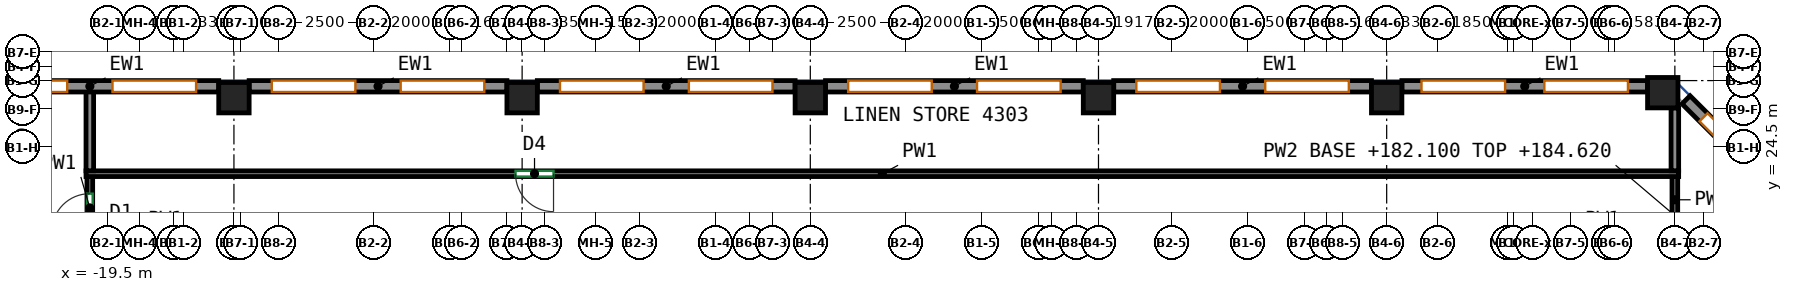
"""IFC4 building model, lengths in metres.
Left out: names, types, materials, properties, quantities, classifications, styles, units other than length and angle.
Written with IfcOpenShell. Run it as: python <this file> out.ifc"""

import sys

from ifc_helpers import new_model, si_unit, direction, frame, frame_2d, origin, origin_2d, place, context, subcontext, project, spatial, rectangle, extrude, source, transform, mapped, element, fill, save


model = new_model("IFC4")
c1 = context("Model", 3, precision=1e-05, world=origin(), true_north=direction((0.0, 1.0)))
c2 = subcontext(c1, "Body", "Model", "MODEL_VIEW")
j1 = project(units=[si_unit("LENGTHUNIT", "METRE"), si_unit("PLANEANGLEUNIT", "RADIAN")], contexts=[c1])
p1 = place(None, origin())
s1 = spatial("IfcSite", under=j1, at=p1, CompositionType="ELEMENT")
p2 = place(p1, origin())
s2 = spatial("IfcBuilding", under=s1, at=p2, CompositionType="ELEMENT")
p3 = place(p2, frame((0.0, 0.0, 182.1)))
s3 = spatial("IfcBuildingStorey", under=s2, at=p3, CompositionType="ELEMENT", Elevation=182.1)
m1 = source(origin(), c2, "Body", "SweptSolid", [
    extrude(rectangle(XDim=0.8, YDim=0.8, at=origin_2d()), origin(), (0.0, 0.0, 1.0), 3.12),
])
for number, where, z_axis, x_axis in (
    (1, (-16.167, 25.8, 0.0), (0.0, 0.0, 1.0), (1.0, 0.0, 0.0)),
    (2, (-8.583, 25.8, 0.0), (0.0, 0.0, 1.0), (1.0, 0.0, 0.0)),
    (3, (-1.0, 25.8, 0.0), (0.0, 0.0, 1.0), (1.0, 0.0, 0.0)),
    (4, (6.583, 25.8, 0.0), (0.0, 0.0, 1.0), (1.0, 0.0, 0.0)),
    (5, (14.167, 25.8, 0.0), (0.0, 0.0, 1.0), (1.0, 0.0, 0.0)),
    (6, (21.432, 25.932, 0.0), (0.0, 0.0, 1.0), (1.0, 0.0, 0.0)),
):
    element("IfcColumn", number, at=place(p3, frame(where, z_axis=z_axis, x_axis=x_axis)), inside=s3, PredefinedType="COLUMN", context=c2, shape_type="MappedRepresentation", body=[
        mapped(m1, transform((0.0, 0.0, 0.0))),
    ])
m2 = source(origin(), c2, "Body", "SweptSolid", [
    extrude(rectangle(XDim=3.5, YDim=0.3, at=frame_2d((1.75, 0.0))), origin(), (0.0, 0.0, 1.0), 3.12),
])
p4 = place(p3, frame((24.519, 23.269, 0.0), z_axis=(0.0, 0.0, 1.0), x_axis=(-0.70707190453, 0.707141656123, 0.0)))
e7 = element("IfcWall", 7, at=p4, inside=s3, PredefinedType="SOLIDWALL", context=c2, shape_type="MappedRepresentation", body=[
    mapped(m2, transform((0.0, 0.0, 0.0))),
])
p5 = place(p4, frame((0.65, 0.0, 0.85)))
e8 = element("IfcOpeningElement", 8, at=p5, cuts=e7, PredefinedType="OPENING", context=c2, shape_type="SweptSolid", body=[
    extrude(rectangle(XDim=2.2, YDim=1.95, at=frame_2d((1.1, 0.975))), frame((0.0, 0.16, 0.0), z_axis=(0.0, -1.0, 0.0), x_axis=(1.0, 0.0, 0.0)), (0.0, 0.0, 1.0), 0.32),
])
m3 = source(origin(), c2, "Body", "SweptSolid", [
    extrude(rectangle(XDim=6.465, YDim=0.3, at=frame_2d((3.232, 0.0))), origin(), (0.0, 0.0, 1.0), 3.12),
])
p6 = place(p3, frame((21.032, 26.1, 0.0), z_axis=(0.0, 0.0, 1.0), x_axis=(-1.0, 0.0, 0.0)))
e9 = element("IfcWall", 9, at=p6, inside=s3, PredefinedType="SOLIDWALL", context=c2, shape_type="MappedRepresentation", body=[
    mapped(m3, transform((0.0, 0.0, 0.0))),
])
p7 = place(p6, frame((0.516, 0.0, 0.85)))
e10 = element("IfcOpeningElement", 10, at=p7, cuts=e9, PredefinedType="OPENING", context=c2, shape_type="SweptSolid", body=[
    extrude(rectangle(XDim=2.2, YDim=1.95, at=frame_2d((1.1, 0.975))), frame((0.0, 0.16, 0.0), z_axis=(0.0, -1.0, 0.0), x_axis=(1.0, 0.0, 0.0)), (0.0, 0.0, 1.0), 0.32),
])
p8 = place(p6, frame((3.749, 0.0, 0.85)))
e11 = element("IfcOpeningElement", 11, at=p8, cuts=e9, PredefinedType="OPENING", context=c2, shape_type="SweptSolid", body=[
    extrude(rectangle(XDim=2.2, YDim=1.95, at=frame_2d((1.1, 0.975))), frame((0.0, 0.16, 0.0), z_axis=(0.0, -1.0, 0.0), x_axis=(1.0, 0.0, 0.0)), (0.0, 0.0, 1.0), 0.32),
])
m4 = source(origin(), c2, "Body", "SweptSolid", [
    extrude(rectangle(XDim=6.783, YDim=0.3, at=frame_2d((3.392, 0.0))), origin(), (0.0, 0.0, 1.0), 3.12),
])
p9 = place(p3, frame((13.767, 26.1, 0.0), z_axis=(0.0, 0.0, 1.0), x_axis=(-1.0, 0.0, 0.0)))
e12 = element("IfcWall", 12, at=p9, inside=s3, PredefinedType="SOLIDWALL", context=c2, shape_type="MappedRepresentation", body=[
    mapped(m4, transform((0.0, 0.0, 0.0))),
])
p10 = place(p9, frame((0.596, 0.0, 0.85)))
e13 = element("IfcOpeningElement", 13, at=p10, cuts=e12, PredefinedType="OPENING", context=c2, shape_type="SweptSolid", body=[
    extrude(rectangle(XDim=2.2, YDim=1.95, at=frame_2d((1.1, 0.975))), frame((0.0, 0.16, 0.0), z_axis=(0.0, -1.0, 0.0), x_axis=(1.0, 0.0, 0.0)), (0.0, 0.0, 1.0), 0.32),
])
p11 = place(p9, frame((3.988, 0.0, 0.85)))
e14 = element("IfcOpeningElement", 14, at=p11, cuts=e12, PredefinedType="OPENING", context=c2, shape_type="SweptSolid", body=[
    extrude(rectangle(XDim=2.2, YDim=1.95, at=frame_2d((1.1, 0.975))), frame((0.0, 0.16, 0.0), z_axis=(0.0, -1.0, 0.0), x_axis=(1.0, 0.0, 0.0)), (0.0, 0.0, 1.0), 0.32),
])
m5 = source(origin(), c2, "Body", "SweptSolid", [
    extrude(rectangle(XDim=6.783, YDim=0.3, at=frame_2d((3.392, 0.0))), origin(), (0.0, 0.0, 1.0), 3.12),
])
p12 = place(p3, frame((6.183, 26.1, 0.0), z_axis=(0.0, 0.0, 1.0), x_axis=(-1.0, 0.0, 0.0)))
e15 = element("IfcWall", 15, at=p12, inside=s3, PredefinedType="SOLIDWALL", context=c2, shape_type="MappedRepresentation", body=[
    mapped(m5, transform((0.0, 0.0, 0.0))),
])
p13 = place(p12, frame((0.596, 0.0, 0.85)))
e16 = element("IfcOpeningElement", 16, at=p13, cuts=e15, PredefinedType="OPENING", context=c2, shape_type="SweptSolid", body=[
    extrude(rectangle(XDim=2.2, YDim=1.95, at=frame_2d((1.1, 0.975))), frame((0.0, 0.16, 0.0), z_axis=(0.0, -1.0, 0.0), x_axis=(1.0, 0.0, 0.0)), (0.0, 0.0, 1.0), 0.32),
])
p14 = place(p12, frame((3.988, 0.0, 0.85)))
e17 = element("IfcOpeningElement", 17, at=p14, cuts=e15, PredefinedType="OPENING", context=c2, shape_type="SweptSolid", body=[
    extrude(rectangle(XDim=2.2, YDim=1.95, at=frame_2d((1.1, 0.975))), frame((0.0, 0.16, 0.0), z_axis=(0.0, -1.0, 0.0), x_axis=(1.0, 0.0, 0.0)), (0.0, 0.0, 1.0), 0.32),
])
p15 = place(p3, frame((-1.4, 26.1, 0.0), z_axis=(0.0, 0.0, 1.0), x_axis=(-1.0, 0.0, 0.0)))
e18 = element("IfcWall", 18, at=p15, inside=s3, PredefinedType="SOLIDWALL", context=c2, shape_type="MappedRepresentation", body=[
    mapped(m5, transform((0.0, 0.0, 0.0))),
])
p16 = place(p15, frame((0.596, 0.0, 0.85)))
e19 = element("IfcOpeningElement", 19, at=p16, cuts=e18, PredefinedType="OPENING", context=c2, shape_type="SweptSolid", body=[
    extrude(rectangle(XDim=2.2, YDim=1.95, at=frame_2d((1.1, 0.975))), frame((0.0, 0.16, 0.0), z_axis=(0.0, -1.0, 0.0), x_axis=(1.0, 0.0, 0.0)), (0.0, 0.0, 1.0), 0.32),
])
p17 = place(p15, frame((3.988, 0.0, 0.85)))
e20 = element("IfcOpeningElement", 20, at=p17, cuts=e18, PredefinedType="OPENING", context=c2, shape_type="SweptSolid", body=[
    extrude(rectangle(XDim=2.2, YDim=1.95, at=frame_2d((1.1, 0.975))), frame((0.0, 0.16, 0.0), z_axis=(0.0, -1.0, 0.0), x_axis=(1.0, 0.0, 0.0)), (0.0, 0.0, 1.0), 0.32),
])
p18 = place(p3, frame((-8.983, 26.1, 0.0), z_axis=(0.0, 0.0, 1.0), x_axis=(-1.0, 0.0, 0.0)))
e21 = element("IfcWall", 21, at=p18, inside=s3, PredefinedType="SOLIDWALL", context=c2, shape_type="MappedRepresentation", body=[
    mapped(m4, transform((0.0, 0.0, 0.0))),
])
p19 = place(p18, frame((0.596, 0.0, 0.85)))
e22 = element("IfcOpeningElement", 22, at=p19, cuts=e21, PredefinedType="OPENING", context=c2, shape_type="SweptSolid", body=[
    extrude(rectangle(XDim=2.2, YDim=1.95, at=frame_2d((1.1, 0.975))), frame((0.0, 0.16, 0.0), z_axis=(0.0, -1.0, 0.0), x_axis=(1.0, 0.0, 0.0)), (0.0, 0.0, 1.0), 0.32),
])
p20 = place(p18, frame((3.988, 0.0, 0.85)))
e23 = element("IfcOpeningElement", 23, at=p20, cuts=e21, PredefinedType="OPENING", context=c2, shape_type="SweptSolid", body=[
    extrude(rectangle(XDim=2.2, YDim=1.95, at=frame_2d((1.1, 0.975))), frame((0.0, 0.16, 0.0), z_axis=(0.0, -1.0, 0.0), x_axis=(1.0, 0.0, 0.0)), (0.0, 0.0, 1.0), 0.32),
])
p21 = place(p3, frame((-16.567, 26.1, 0.0), z_axis=(0.0, 0.0, 1.0), x_axis=(-1.0, 0.0, 0.0)))
e24 = element("IfcWall", 24, at=p21, inside=s3, PredefinedType="SOLIDWALL", context=c2, shape_type="MappedRepresentation", body=[
    mapped(m5, transform((0.0, 0.0, 0.0))),
])
p22 = place(p21, frame((0.596, 0.0, 0.85)))
e25 = element("IfcOpeningElement", 25, at=p22, cuts=e24, PredefinedType="OPENING", context=c2, shape_type="SweptSolid", body=[
    extrude(rectangle(XDim=2.2, YDim=1.95, at=frame_2d((1.1, 0.975))), frame((0.0, 0.16, 0.0), z_axis=(0.0, -1.0, 0.0), x_axis=(1.0, 0.0, 0.0)), (0.0, 0.0, 1.0), 0.32),
])
p23 = place(p21, frame((3.988, 0.0, 0.85)))
e26 = element("IfcOpeningElement", 26, at=p23, cuts=e24, PredefinedType="OPENING", context=c2, shape_type="SweptSolid", body=[
    extrude(rectangle(XDim=2.2, YDim=1.95, at=frame_2d((1.1, 0.975))), frame((0.0, 0.16, 0.0), z_axis=(0.0, -1.0, 0.0), x_axis=(1.0, 0.0, 0.0)), (0.0, 0.0, 1.0), 0.32),
])
p24 = place(p3, frame((-19.959, 22.075, 0.0), z_axis=(0.0, 0.0, 1.0), x_axis=(0.0, 1.0, 0.0)))
e27 = element("IfcWall", 27, at=p24, inside=s3, PredefinedType="PARTITIONING", context=c2, shape_type="SweptSolid", body=[
    extrude(rectangle(XDim=1.65, YDim=0.15, at=frame_2d((0.825, 0.0))), origin(), (0.0, 0.0, 1.0), 3.12),
])
p25 = place(p24, frame((0.2, 0.0, 0.0)))
e28 = element("IfcOpeningElement", 28, at=p25, cuts=e27, PredefinedType="OPENING", context=c2, shape_type="SweptSolid", body=[
    extrude(rectangle(XDim=1.0, YDim=2.1, at=frame_2d((0.5, 1.05))), frame((0.0, 0.085, 0.0), z_axis=(0.0, -1.0, 0.0), x_axis=(1.0, 0.0, 0.0)), (0.0, 0.0, 1.0), 0.17),
])
p26 = place(p3, frame((21.75, 22.503, 0.0), z_axis=(0.0, 0.0, 1.0), x_axis=(0.0, 1.0, 0.0)))
e29 = element("IfcWall", 29, at=p26, inside=s3, PredefinedType="PARTITIONING", context=c2, shape_type="SweptSolid", body=[
    extrude(rectangle(XDim=1.222, YDim=0.15, at=frame_2d((0.611, 0.0))), origin(), (0.0, 0.0, 1.0), 3.12),
])
p27 = place(p3, frame((21.85, 23.8, 0.0), z_axis=(0.0, 0.0, 1.0), x_axis=(-1.0, 0.0, 0.0)))
e30 = element("IfcWall", 30, at=p27, inside=s3, PredefinedType="PARTITIONING", context=c2, shape_type="SweptSolid", body=[
    extrude(rectangle(XDim=41.909, YDim=0.15, at=frame_2d((20.955, 0.0))), origin(), (0.0, 0.0, 1.0), 3.12),
])
p28 = place(p27, frame((29.607, 0.0, 0.0)))
e31 = element("IfcOpeningElement", 31, at=p28, cuts=e30, PredefinedType="OPENING", context=c2, shape_type="SweptSolid", body=[
    extrude(rectangle(XDim=1.0, YDim=2.1, at=frame_2d((0.5, 1.05))), frame((0.0, 0.085, 0.0), z_axis=(0.0, -1.0, 0.0), x_axis=(1.0, 0.0, 0.0)), (0.0, 0.0, 1.0), 0.17),
])
p29 = place(p3, frame((-19.959, 23.877, 0.0), z_axis=(0.0, 0.0, 1.0), x_axis=(0.0, 1.0, 0.0)))
e32 = element("IfcWall", 32, at=p29, inside=s3, PredefinedType="PARTITIONING", context=c2, shape_type="SweptSolid", body=[
    extrude(rectangle(XDim=2.123, YDim=0.2, at=frame_2d((1.062, 0.0))), origin(), (0.0, 0.0, 1.0), 3.12),
])
p30 = place(p3, frame((21.75, 25.532, 0.0), z_axis=(0.0, 0.0, 1.0), x_axis=(0.0, -1.0, 0.0)))
e33 = element("IfcWall", 33, at=p30, inside=s3, PredefinedType="PARTITIONING", context=c2, shape_type="SweptSolid", body=[
    extrude(rectangle(XDim=1.655, YDim=0.2, at=frame_2d((0.828, 0.0))), origin(), (0.0, 0.0, 1.0), 3.12),
])
p31 = place(p5, origin())
e34 = element("IfcWindow", 34, at=p31, inside=s3, PartitioningType="SINGLE_PANEL", PredefinedType="WINDOW", context=c2, shape_type="SweptSolid", body=[
    extrude(rectangle(XDim=2.2, YDim=1.95, at=frame_2d((1.1, 0.975))), frame((0.0, 0.03, 0.0), z_axis=(0.0, -1.0, 0.0), x_axis=(1.0, 0.0, 0.0)), (0.0, 0.0, 1.0), 0.06),
])
fill(e8, e34)
p32 = place(p7, origin())
e35 = element("IfcWindow", 35, at=p32, inside=s3, PartitioningType="SINGLE_PANEL", PredefinedType="WINDOW", context=c2, shape_type="SweptSolid", body=[
    extrude(rectangle(XDim=2.2, YDim=1.95, at=frame_2d((1.1, 0.975))), frame((0.0, 0.03, 0.0), z_axis=(0.0, -1.0, 0.0), x_axis=(1.0, 0.0, 0.0)), (0.0, 0.0, 1.0), 0.06),
])
fill(e10, e35)
p33 = place(p8, origin())
e36 = element("IfcWindow", 36, at=p33, inside=s3, PartitioningType="SINGLE_PANEL", PredefinedType="WINDOW", context=c2, shape_type="SweptSolid", body=[
    extrude(rectangle(XDim=2.2, YDim=1.95, at=frame_2d((1.1, 0.975))), frame((0.0, 0.03, 0.0), z_axis=(0.0, -1.0, 0.0), x_axis=(1.0, 0.0, 0.0)), (0.0, 0.0, 1.0), 0.06),
])
fill(e11, e36)
p34 = place(p10, origin())
e37 = element("IfcWindow", 37, at=p34, inside=s3, PartitioningType="SINGLE_PANEL", PredefinedType="WINDOW", context=c2, shape_type="SweptSolid", body=[
    extrude(rectangle(XDim=2.2, YDim=1.95, at=frame_2d((1.1, 0.975))), frame((0.0, 0.03, 0.0), z_axis=(0.0, -1.0, 0.0), x_axis=(1.0, 0.0, 0.0)), (0.0, 0.0, 1.0), 0.06),
])
fill(e13, e37)
p35 = place(p11, origin())
e38 = element("IfcWindow", 38, at=p35, inside=s3, PartitioningType="SINGLE_PANEL", PredefinedType="WINDOW", context=c2, shape_type="SweptSolid", body=[
    extrude(rectangle(XDim=2.2, YDim=1.95, at=frame_2d((1.1, 0.975))), frame((0.0, 0.03, 0.0), z_axis=(0.0, -1.0, 0.0), x_axis=(1.0, 0.0, 0.0)), (0.0, 0.0, 1.0), 0.06),
])
fill(e14, e38)
p36 = place(p13, origin())
e39 = element("IfcWindow", 39, at=p36, inside=s3, PartitioningType="SINGLE_PANEL", PredefinedType="WINDOW", context=c2, shape_type="SweptSolid", body=[
    extrude(rectangle(XDim=2.2, YDim=1.95, at=frame_2d((1.1, 0.975))), frame((0.0, 0.03, 0.0), z_axis=(0.0, -1.0, 0.0), x_axis=(1.0, 0.0, 0.0)), (0.0, 0.0, 1.0), 0.06),
])
fill(e16, e39)
p37 = place(p14, origin())
e40 = element("IfcWindow", 40, at=p37, inside=s3, PartitioningType="SINGLE_PANEL", PredefinedType="WINDOW", context=c2, shape_type="SweptSolid", body=[
    extrude(rectangle(XDim=2.2, YDim=1.95, at=frame_2d((1.1, 0.975))), frame((0.0, 0.03, 0.0), z_axis=(0.0, -1.0, 0.0), x_axis=(1.0, 0.0, 0.0)), (0.0, 0.0, 1.0), 0.06),
])
fill(e17, e40)
p38 = place(p16, origin())
e41 = element("IfcWindow", 41, at=p38, inside=s3, PartitioningType="SINGLE_PANEL", PredefinedType="WINDOW", context=c2, shape_type="SweptSolid", body=[
    extrude(rectangle(XDim=2.2, YDim=1.95, at=frame_2d((1.1, 0.975))), frame((0.0, 0.03, 0.0), z_axis=(0.0, -1.0, 0.0), x_axis=(1.0, 0.0, 0.0)), (0.0, 0.0, 1.0), 0.06),
])
fill(e19, e41)
p39 = place(p17, origin())
e42 = element("IfcWindow", 42, at=p39, inside=s3, PartitioningType="SINGLE_PANEL", PredefinedType="WINDOW", context=c2, shape_type="SweptSolid", body=[
    extrude(rectangle(XDim=2.2, YDim=1.95, at=frame_2d((1.1, 0.975))), frame((0.0, 0.03, 0.0), z_axis=(0.0, -1.0, 0.0), x_axis=(1.0, 0.0, 0.0)), (0.0, 0.0, 1.0), 0.06),
])
fill(e20, e42)
p40 = place(p19, origin())
e43 = element("IfcWindow", 43, at=p40, inside=s3, PartitioningType="SINGLE_PANEL", PredefinedType="WINDOW", context=c2, shape_type="SweptSolid", body=[
    extrude(rectangle(XDim=2.2, YDim=1.95, at=frame_2d((1.1, 0.975))), frame((0.0, 0.03, 0.0), z_axis=(0.0, -1.0, 0.0), x_axis=(1.0, 0.0, 0.0)), (0.0, 0.0, 1.0), 0.06),
])
fill(e22, e43)
p41 = place(p20, origin())
e44 = element("IfcWindow", 44, at=p41, inside=s3, PartitioningType="SINGLE_PANEL", PredefinedType="WINDOW", context=c2, shape_type="SweptSolid", body=[
    extrude(rectangle(XDim=2.2, YDim=1.95, at=frame_2d((1.1, 0.975))), frame((0.0, 0.03, 0.0), z_axis=(0.0, -1.0, 0.0), x_axis=(1.0, 0.0, 0.0)), (0.0, 0.0, 1.0), 0.06),
])
fill(e23, e44)
p42 = place(p22, origin())
e45 = element("IfcWindow", 45, at=p42, inside=s3, PartitioningType="SINGLE_PANEL", PredefinedType="WINDOW", context=c2, shape_type="SweptSolid", body=[
    extrude(rectangle(XDim=2.2, YDim=1.95, at=frame_2d((1.1, 0.975))), frame((0.0, 0.03, 0.0), z_axis=(0.0, -1.0, 0.0), x_axis=(1.0, 0.0, 0.0)), (0.0, 0.0, 1.0), 0.06),
])
fill(e25, e45)
p43 = place(p23, origin())
e46 = element("IfcWindow", 46, at=p43, inside=s3, PartitioningType="SINGLE_PANEL", PredefinedType="WINDOW", context=c2, shape_type="SweptSolid", body=[
    extrude(rectangle(XDim=2.2, YDim=1.95, at=frame_2d((1.1, 0.975))), frame((0.0, 0.03, 0.0), z_axis=(0.0, -1.0, 0.0), x_axis=(1.0, 0.0, 0.0)), (0.0, 0.0, 1.0), 0.06),
])
fill(e26, e46)
p44 = place(p25, origin())
e47 = element("IfcDoor", 47, at=p44, inside=s3, OperationType="SINGLE_SWING_LEFT", PredefinedType="DOOR", context=c2, shape_type="SweptSolid", body=[
    extrude(rectangle(XDim=1.0, YDim=2.1, at=frame_2d((0.5, 1.05))), frame((0.0, 0.025, 0.0), z_axis=(0.0, -1.0, 0.0), x_axis=(1.0, 0.0, 0.0)), (0.0, 0.0, 1.0), 0.05),
])
fill(e28, e47)
p45 = place(p28, origin())
e48 = element("IfcDoor", 48, at=p45, inside=s3, OperationType="SINGLE_SWING_LEFT", PredefinedType="DOOR", context=c2, shape_type="SweptSolid", body=[
    extrude(rectangle(XDim=1.0, YDim=2.1, at=frame_2d((0.5, 1.05))), frame((0.0, 0.025, 0.0), z_axis=(0.0, -1.0, 0.0), x_axis=(1.0, 0.0, 0.0)), (0.0, 0.0, 1.0), 0.05),
])
fill(e31, e48)
save(model, sys.argv[1])
